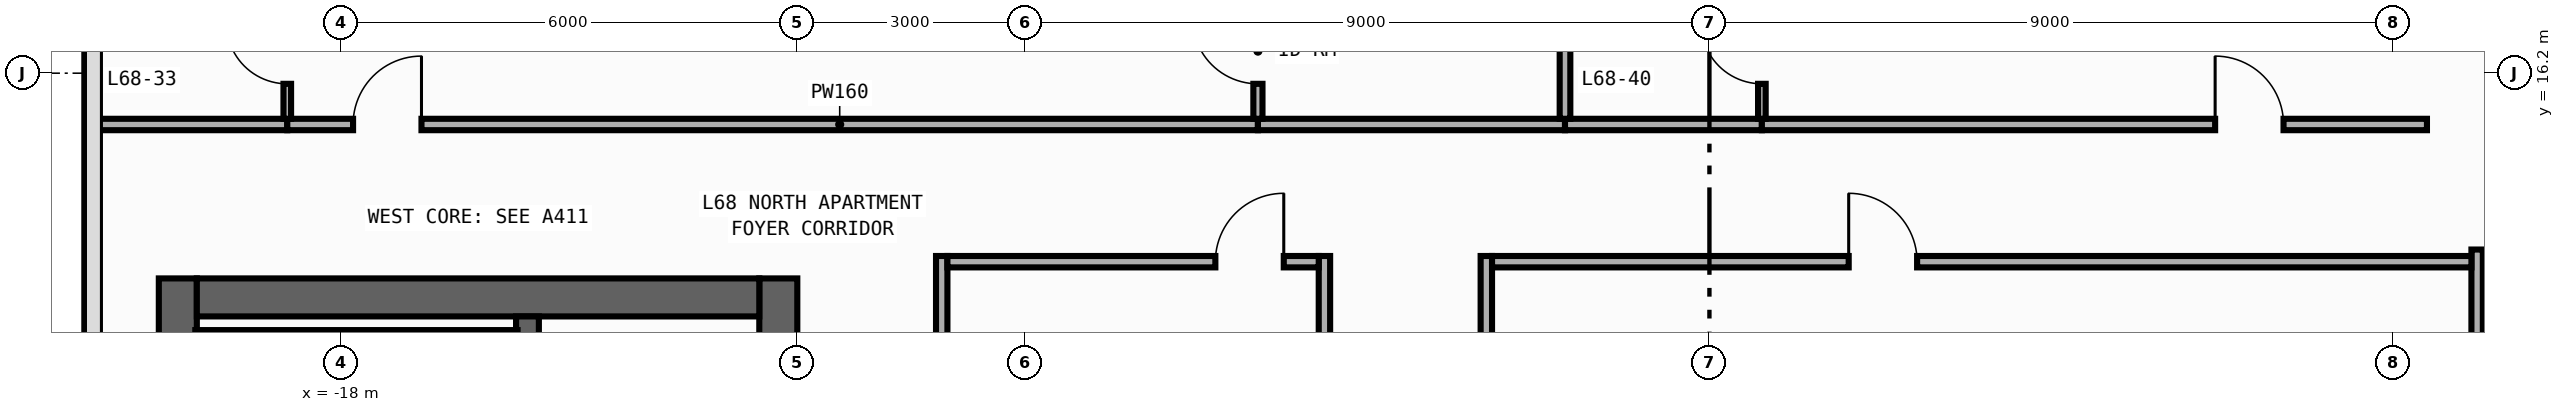
"""IFC4 building model, lengths in metres.
Left out: names, types, materials, properties, quantities, classifications, styles, units other than length and angle.
Written with IfcOpenShell. Run it as: python <this file> out.ifc"""

import sys

from ifc_helpers import new_model, si_unit, direction, frame, frame_2d, origin, place, context, subcontext, project, spatial, rectangle, extrude, element, fill, save


model = new_model("IFC4")
c1 = context("Model", 3, precision=1e-05, world=origin(), true_north=direction((0.0, 1.0)))
c2 = subcontext(c1, "Body", "Model", "MODEL_VIEW")
j1 = project(units=[si_unit("LENGTHUNIT", "METRE"), si_unit("PLANEANGLEUNIT", "RADIAN")], contexts=[c1])
p1 = place(None, origin())
s1 = spatial("IfcSite", under=j1, at=p1, CompositionType="ELEMENT")
p2 = place(p1, origin())
s2 = spatial("IfcBuilding", under=s1, at=p2, CompositionType="ELEMENT")
p3 = place(p2, frame((0.0, 0.0, 285.2)))
s3 = spatial("IfcBuildingStorey", under=s2, at=p3, CompositionType="ELEMENT", Elevation=285.2)
p4 = place(p3, frame((-20.15, -13.5, 0.0), z_axis=(0.0, 0.0, 1.0), x_axis=(0.0, 1.0, 0.0)))
e1 = element("IfcWall", 1, at=p4, inside=s3, PredefinedType="SHEAR", context=c2, shape_type="SweptSolid", body=[
    extrude(rectangle(XDim=27.0, YDim=0.5, at=frame_2d((13.5, 0.0))), origin(), (0.0, 0.0, 1.0), 3.54),
])
p5 = place(p3, frame((-12.25, -13.5, 0.0), z_axis=(0.0, 0.0, 1.0), x_axis=(0.0, 1.0, 0.0)))
e2 = element("IfcWall", 2, at=p5, inside=s3, PredefinedType="SHEAR", context=c2, shape_type="SweptSolid", body=[
    extrude(rectangle(XDim=27.0, YDim=0.5, at=frame_2d((13.5, 0.0))), origin(), (0.0, 0.0, 1.0), 3.54),
])
p6 = place(p5, frame((15.175, 0.0, 0.0)))
e3 = element("IfcOpeningElement", 3, at=p6, cuts=e2, PredefinedType="OPENING", context=c2, shape_type="SweptSolid", body=[
    extrude(rectangle(XDim=0.85, YDim=2.1, at=frame_2d((0.425, 1.05))), frame((0.0, 0.26, 0.0), z_axis=(0.0, -1.0, 0.0), x_axis=(1.0, 0.0, 0.0)), (0.0, 0.0, 1.0), 0.52),
])
p7 = place(p5, frame((21.275, 0.0, 0.0)))
e4 = element("IfcOpeningElement", 4, at=p7, cuts=e2, PredefinedType="OPENING", context=c2, shape_type="SweptSolid", body=[
    extrude(rectangle(XDim=0.85, YDim=2.1, at=frame_2d((0.425, 1.05))), frame((0.0, 0.26, 0.0), z_axis=(0.0, -1.0, 0.0), x_axis=(1.0, 0.0, 0.0)), (0.0, 0.0, 1.0), 0.52),
])
p8 = place(p5, frame((4.275, 0.0, 0.0)))
e5 = element("IfcOpeningElement", 5, at=p8, cuts=e2, PredefinedType="OPENING", context=c2, shape_type="SweptSolid", body=[
    extrude(rectangle(XDim=0.85, YDim=2.1, at=frame_2d((0.425, 1.05))), frame((0.0, 0.26, 0.0), z_axis=(0.0, -1.0, 0.0), x_axis=(1.0, 0.0, 0.0)), (0.0, 0.0, 1.0), 0.52),
])
p9 = place(p5, frame((10.275, 0.0, 0.0)))
e6 = element("IfcOpeningElement", 6, at=p9, cuts=e2, PredefinedType="OPENING", context=c2, shape_type="SweptSolid", body=[
    extrude(rectangle(XDim=0.85, YDim=2.1, at=frame_2d((0.425, 1.05))), frame((0.0, 0.26, 0.0), z_axis=(0.0, -1.0, 0.0), x_axis=(1.0, 0.0, 0.0)), (0.0, 0.0, 1.0), 0.52),
])
p10 = place(p5, frame((12.725, 0.0, 0.0)))
e7 = element("IfcOpeningElement", 7, at=p10, cuts=e2, PredefinedType="OPENING", context=c2, shape_type="SweptSolid", body=[
    extrude(rectangle(XDim=1.15, YDim=2.2, at=frame_2d((0.575, 1.1))), frame((0.0, 0.26, 0.0), z_axis=(0.0, -1.0, 0.0), x_axis=(1.0, 0.0, 0.0)), (0.0, 0.0, 1.0), 0.52),
])
p11 = place(p5, frame((1.625, 0.0, 0.0)))
e8 = element("IfcOpeningElement", 8, at=p11, cuts=e2, PredefinedType="OPENING", context=c2, shape_type="SweptSolid", body=[
    extrude(rectangle(XDim=0.85, YDim=2.1, at=frame_2d((0.425, 1.05))), frame((0.0, 0.26, 0.0), z_axis=(0.0, -1.0, 0.0), x_axis=(1.0, 0.0, 0.0)), (0.0, 0.0, 1.0), 0.52),
])
p12 = place(p3, frame((-19.9, 13.25, 0.0), z_axis=(0.0, 0.0, 1.0), x_axis=(1.0, 0.0, 0.0)))
e9 = element("IfcWall", 9, at=p12, inside=s3, PredefinedType="SHEAR", context=c2, shape_type="SweptSolid", body=[
    extrude(rectangle(XDim=7.4, YDim=0.5, at=frame_2d((3.7, 0.0))), origin(), (0.0, 0.0, 1.0), 3.54),
])
p13 = place(p3, frame((-15.55, -13.0, 0.0), z_axis=(0.0, 0.0, 1.0), x_axis=(0.0, 1.0, 0.0)))
e10 = element("IfcWall", 10, at=p13, inside=s3, PredefinedType="SHEAR", context=c2, shape_type="SweptSolid", body=[
    extrude(rectangle(XDim=26.0, YDim=0.3, at=frame_2d((13.0, 0.0))), origin(), (0.0, 0.0, 1.0), 3.54),
])
p14 = place(p13, frame((12.225, 0.0, 0.0)))
e11 = element("IfcOpeningElement", 11, at=p14, cuts=e10, PredefinedType="OPENING", context=c2, shape_type="SweptSolid", body=[
    extrude(rectangle(XDim=1.15, YDim=2.2, at=frame_2d((0.575, 1.1))), frame((0.0, 0.16, 0.0), z_axis=(0.0, -1.0, 0.0), x_axis=(1.0, 0.0, 0.0)), (0.0, 0.0, 1.0), 0.32),
])
p15 = place(p13, frame((1.125, 0.0, 0.0)))
e12 = element("IfcOpeningElement", 12, at=p15, cuts=e10, PredefinedType="OPENING", context=c2, shape_type="SweptSolid", body=[
    extrude(rectangle(XDim=0.85, YDim=2.1, at=frame_2d((0.425, 1.05))), frame((0.0, 0.16, 0.0), z_axis=(0.0, -1.0, 0.0), x_axis=(1.0, 0.0, 0.0)), (0.0, 0.0, 1.0), 0.32),
])
p16 = place(p3, frame((-19.92, 12.71, 0.0), z_axis=(0.0, 0.0, 1.0), x_axis=(1.0, 0.0, 0.0)))
e13 = element("IfcWall", 13, at=p16, inside=s3, PredefinedType="SHEAR", context=c2, shape_type="SweptSolid", body=[
    extrude(rectangle(XDim=4.24, YDim=0.22, at=frame_2d((2.12, 0.0))), origin(), (0.0, 0.0, 1.0), 3.54),
])
p17 = place(p3, frame((-10.1, -2.81, 0.0), z_axis=(0.0, 0.0, 1.0), x_axis=(0.0, 1.0, 0.0)))
e14 = element("IfcWall", 14, at=p17, inside=s3, PredefinedType="PARTITIONING", context=c2, shape_type="SweptSolid", body=[
    extrude(rectangle(XDim=16.605, YDim=0.15, at=frame_2d((8.302, 0.0))), origin(), (0.0, 0.0, 1.0), 3.54),
])
p18 = place(p17, frame((7.751, 0.0, 0.0)))
e15 = element("IfcOpeningElement", 15, at=p18, cuts=e14, PredefinedType="OPENING", context=c2, shape_type="SweptSolid", body=[
    extrude(rectangle(XDim=0.9, YDim=2.15, at=frame_2d((0.45, 1.075))), frame((0.0, 0.085, 0.0), z_axis=(0.0, -1.0, 0.0), x_axis=(1.0, 0.0, 0.0)), (0.0, 0.0, 1.0), 0.17),
])
p19 = place(p3, frame((10.1, -2.81, 0.0), z_axis=(0.0, 0.0, 1.0), x_axis=(0.0, 1.0, 0.0)))
e16 = element("IfcWall", 16, at=p19, inside=s3, PredefinedType="PARTITIONING", context=c2, shape_type="SweptSolid", body=[
    extrude(rectangle(XDim=16.69, YDim=0.15, at=frame_2d((8.345, 0.0))), origin(), (0.0, 0.0, 1.0), 3.54),
])
p20 = place(p19, frame((7.694, 0.0, 0.0)))
e17 = element("IfcOpeningElement", 17, at=p20, cuts=e16, PredefinedType="OPENING", context=c2, shape_type="SweptSolid", body=[
    extrude(rectangle(XDim=0.9, YDim=2.15, at=frame_2d((0.45, 1.075))), frame((0.0, 0.085, 0.0), z_axis=(0.0, -1.0, 0.0), x_axis=(1.0, 0.0, 0.0)), (0.0, 0.0, 1.0), 0.17),
])
p21 = place(p3, frame((-5.065, -2.66, 0.0), z_axis=(0.0, 0.0, 1.0), x_axis=(0.0, 1.0, 0.0)))
e18 = element("IfcWall", 18, at=p21, inside=s3, PredefinedType="PARTITIONING", context=c2, shape_type="SweptSolid", body=[
    extrude(rectangle(XDim=16.455, YDim=0.15, at=frame_2d((8.228, 0.0))), origin(), (0.0, 0.0, 1.0), 3.19),
])
p22 = place(p21, frame((7.677, 0.0, 0.0)))
e19 = element("IfcOpeningElement", 19, at=p22, cuts=e18, PredefinedType="OPENING", context=c2, shape_type="SweptSolid", body=[
    extrude(rectangle(XDim=0.9, YDim=2.15, at=frame_2d((0.45, 1.075))), frame((0.0, 0.085, 0.0), z_axis=(0.0, -1.0, 0.0), x_axis=(1.0, 0.0, 0.0)), (0.0, 0.0, 1.0), 0.17),
])
p23 = place(p3, frame((-2.935, -2.66, 0.0), z_axis=(0.0, 0.0, 1.0), x_axis=(0.0, 1.0, 0.0)))
e20 = element("IfcWall", 20, at=p23, inside=s3, PredefinedType="PARTITIONING", context=c2, shape_type="SweptSolid", body=[
    extrude(rectangle(XDim=16.455, YDim=0.15, at=frame_2d((8.228, 0.0))), origin(), (0.0, 0.0, 1.0), 3.54),
])
p24 = place(p23, frame((7.677, 0.0, 0.0)))
e21 = element("IfcOpeningElement", 21, at=p24, cuts=e20, PredefinedType="OPENING", context=c2, shape_type="SweptSolid", body=[
    extrude(rectangle(XDim=0.9, YDim=2.15, at=frame_2d((0.45, 1.075))), frame((0.0, 0.085, 0.0), z_axis=(0.0, -1.0, 0.0), x_axis=(1.0, 0.0, 0.0)), (0.0, 0.0, 1.0), 0.17),
])
p25 = place(p3, frame((-21.255, 15.525, 0.0), z_axis=(0.0, 0.0, 1.0), x_axis=(1.0, 0.0, 0.0)))
e22 = element("IfcWall", 22, at=p25, inside=s3, PredefinedType="PARTITIONING", context=c2, shape_type="SweptSolid", body=[
    extrude(rectangle(XDim=2.545, YDim=0.15, at=frame_2d((1.272, 0.0))), origin(), (0.0, 0.0, 1.0), 3.54),
])
p26 = place(p3, frame((-18.71, 15.525, 0.0), z_axis=(0.0, 0.0, 1.0), x_axis=(1.0, 0.0, 0.0)))
e23 = element("IfcWall", 23, at=p26, inside=s3, PredefinedType="PARTITIONING", context=c2, shape_type="SweptSolid", body=[
    extrude(rectangle(XDim=12.77, YDim=0.15, at=frame_2d((6.385, 0.0))), origin(), (0.0, 0.0, 1.0), 3.54),
])
p27 = place(p26, frame((0.865, 0.0, 0.0)))
e24 = element("IfcOpeningElement", 24, at=p27, cuts=e23, PredefinedType="OPENING", context=c2, shape_type="SweptSolid", body=[
    extrude(rectangle(XDim=0.9, YDim=2.15, at=frame_2d((0.45, 1.075))), frame((0.0, 0.085, 0.0), z_axis=(0.0, -1.0, 0.0), x_axis=(1.0, 0.0, 0.0)), (0.0, 0.0, 1.0), 0.17),
])
p28 = place(p3, frame((-5.94, 15.525, 0.0), z_axis=(0.0, 0.0, 1.0), x_axis=(1.0, 0.0, 0.0)))
e25 = element("IfcWall", 25, at=p28, inside=s3, PredefinedType="PARTITIONING", context=c2, shape_type="SweptSolid", body=[
    extrude(rectangle(XDim=4.04, YDim=0.15, at=frame_2d((2.02, 0.0))), origin(), (0.0, 0.0, 1.0), 3.54),
])
p29 = place(p3, frame((-1.9, 15.525, 0.0), z_axis=(0.0, 0.0, 1.0), x_axis=(1.0, 0.0, 0.0)))
e26 = element("IfcWall", 26, at=p29, inside=s3, PredefinedType="PARTITIONING", context=c2, shape_type="SweptSolid", body=[
    extrude(rectangle(XDim=2.59, YDim=0.15, at=frame_2d((1.295, 0.0))), origin(), (0.0, 0.0, 1.0), 3.54),
])
p30 = place(p3, frame((0.69, 15.525, 0.0), z_axis=(0.0, 0.0, 1.0), x_axis=(1.0, 0.0, 0.0)))
e27 = element("IfcWall", 27, at=p30, inside=s3, PredefinedType="PARTITIONING", context=c2, shape_type="SweptSolid", body=[
    extrude(rectangle(XDim=8.75, YDim=0.15, at=frame_2d((4.375, 0.0))), origin(), (0.0, 0.0, 1.0), 3.54),
])
p31 = place(p30, frame((5.963, 0.0, 0.0)))
e28 = element("IfcOpeningElement", 28, at=p31, cuts=e27, PredefinedType="OPENING", context=c2, shape_type="SweptSolid", body=[
    extrude(rectangle(XDim=0.9, YDim=2.15, at=frame_2d((0.45, 1.075))), frame((0.0, 0.085, 0.0), z_axis=(0.0, -1.0, 0.0), x_axis=(1.0, 0.0, 0.0)), (0.0, 0.0, 1.0), 0.17),
])
p32 = place(p3, frame((-10.025, 13.72, 0.0), z_axis=(0.0, 0.0, 1.0), x_axis=(1.0, 0.0, 0.0)))
e29 = element("IfcWall", 29, at=p32, inside=s3, PredefinedType="PARTITIONING", context=c2, shape_type="SweptSolid", body=[
    extrude(rectangle(XDim=4.885, YDim=0.15, at=frame_2d((2.442, 0.0))), origin(), (0.0, 0.0, 1.0), 3.54),
])
p33 = place(p32, frame((3.525, 0.0, 0.0)))
e30 = element("IfcOpeningElement", 30, at=p33, cuts=e29, PredefinedType="OPENING", context=c2, shape_type="SweptSolid", body=[
    extrude(rectangle(XDim=0.9, YDim=2.15, at=frame_2d((0.45, 1.075))), frame((0.0, 0.085, 0.0), z_axis=(0.0, -1.0, 0.0), x_axis=(1.0, 0.0, 0.0)), (0.0, 0.0, 1.0), 0.17),
])
p34 = place(p3, frame((-2.86, 13.72, 0.0), z_axis=(0.0, 0.0, 1.0), x_axis=(1.0, 0.0, 0.0)))
e31 = element("IfcWall", 31, at=p34, inside=s3, PredefinedType="PARTITIONING", context=c2, shape_type="SweptSolid", body=[
    extrude(rectangle(XDim=12.885, YDim=0.15, at=frame_2d((6.442, 0.0))), origin(), (0.0, 0.0, 1.0), 3.54),
])
p35 = place(p34, frame((4.692, 0.0, 0.0)))
e32 = element("IfcOpeningElement", 32, at=p35, cuts=e31, PredefinedType="OPENING", context=c2, shape_type="SweptSolid", body=[
    extrude(rectangle(XDim=0.9, YDim=2.15, at=frame_2d((0.45, 1.075))), frame((0.0, 0.085, 0.0), z_axis=(0.0, -1.0, 0.0), x_axis=(1.0, 0.0, 0.0)), (0.0, 0.0, 1.0), 0.17),
])
p36 = place(p3, frame((-18.71, 15.6, 0.0), z_axis=(0.0, 0.0, 1.0), x_axis=(0.0, 1.0, 0.0)))
e33 = element("IfcWall", 33, at=p36, inside=s3, PredefinedType="PARTITIONING", context=c2, shape_type="SweptSolid", body=[
    extrude(rectangle(XDim=2.5, YDim=0.1, at=frame_2d((1.25, 0.0))), origin(), (0.0, 0.0, 1.0), 3.54),
])
p37 = place(p36, frame((0.46, 0.0, 0.0)))
e34 = element("IfcOpeningElement", 34, at=p37, cuts=e33, PredefinedType="OPENING", context=c2, shape_type="SweptSolid", body=[
    extrude(rectangle(XDim=0.8, YDim=2.1, at=frame_2d((0.4, 1.05))), frame((0.0, 0.06, 0.0), z_axis=(0.0, -1.0, 0.0), x_axis=(1.0, 0.0, 0.0)), (0.0, 0.0, 1.0), 0.12),
])
p38 = place(p3, frame((-5.94, 15.6, 0.0), z_axis=(0.0, 0.0, 1.0), x_axis=(0.0, 1.0, 0.0)))
e35 = element("IfcWall", 35, at=p38, inside=s3, PredefinedType="PARTITIONING", context=c2, shape_type="SweptSolid", body=[
    extrude(rectangle(XDim=4.5, YDim=0.12, at=frame_2d((2.25, 0.0))), origin(), (0.0, 0.0, 1.0), 3.54),
])
p39 = place(p38, frame((0.46, 0.0, 0.0)))
e36 = element("IfcOpeningElement", 36, at=p39, cuts=e35, PredefinedType="OPENING", context=c2, shape_type="SweptSolid", body=[
    extrude(rectangle(XDim=0.86, YDim=2.15, at=frame_2d((0.43, 1.075))), frame((0.0, 0.07, 0.0), z_axis=(0.0, -1.0, 0.0), x_axis=(1.0, 0.0, 0.0)), (0.0, 0.0, 1.0), 0.14),
])
p40 = place(p3, frame((-1.9, 15.6, 0.0), z_axis=(0.0, 0.0, 1.0), x_axis=(0.0, 1.0, 0.0)))
e37 = element("IfcWall", 37, at=p40, inside=s3, PredefinedType="PARTITIONING", context=c2, shape_type="SweptSolid", body=[
    extrude(rectangle(XDim=2.5, YDim=0.14, at=frame_2d((1.25, 0.0))), origin(), (0.0, 0.0, 1.0), 3.54),
])
p41 = place(p3, frame((0.69, 15.6, 0.0), z_axis=(0.0, 0.0, 1.0), x_axis=(0.0, 1.0, 0.0)))
e38 = element("IfcWall", 38, at=p41, inside=s3, PredefinedType="PARTITIONING", context=c2, shape_type="SweptSolid", body=[
    extrude(rectangle(XDim=2.5, YDim=0.1, at=frame_2d((1.25, 0.0))), origin(), (0.0, 0.0, 1.0), 3.54),
])
p42 = place(p41, frame((0.46, 0.0, 0.0)))
e39 = element("IfcOpeningElement", 39, at=p42, cuts=e38, PredefinedType="OPENING", context=c2, shape_type="SweptSolid", body=[
    extrude(rectangle(XDim=0.8, YDim=2.1, at=frame_2d((0.4, 1.05))), frame((0.0, 0.06, 0.0), z_axis=(0.0, -1.0, 0.0), x_axis=(1.0, 0.0, 0.0)), (0.0, 0.0, 1.0), 0.12),
])
p43 = place(p27, origin())
e40 = element("IfcDoor", 40, at=p43, inside=s3, OperationType="SINGLE_SWING_RIGHT", PredefinedType="DOOR", context=c2, shape_type="SweptSolid", body=[
    extrude(rectangle(XDim=0.9, YDim=2.15, at=frame_2d((0.45, 1.075))), frame((0.0, 0.025, 0.0), z_axis=(0.0, -1.0, 0.0), x_axis=(1.0, 0.0, 0.0)), (0.0, 0.0, 1.0), 0.05),
])
fill(e24, e40)
p44 = place(p31, origin())
e41 = element("IfcDoor", 41, at=p44, inside=s3, OperationType="SINGLE_SWING_LEFT", PredefinedType="DOOR", context=c2, shape_type="SweptSolid", body=[
    extrude(rectangle(XDim=0.9, YDim=2.15, at=frame_2d((0.45, 1.075))), frame((0.0, 0.025, 0.0), z_axis=(0.0, -1.0, 0.0), x_axis=(1.0, 0.0, 0.0)), (0.0, 0.0, 1.0), 0.05),
])
fill(e28, e41)
p45 = place(p33, origin())
e42 = element("IfcDoor", 42, at=p45, inside=s3, OperationType="SINGLE_SWING_RIGHT", PredefinedType="DOOR", context=c2, shape_type="SweptSolid", body=[
    extrude(rectangle(XDim=0.9, YDim=2.15, at=frame_2d((0.45, 1.075))), frame((0.0, 0.025, 0.0), z_axis=(0.0, -1.0, 0.0), x_axis=(1.0, 0.0, 0.0)), (0.0, 0.0, 1.0), 0.05),
])
fill(e30, e42)
p46 = place(p35, origin())
e43 = element("IfcDoor", 43, at=p46, inside=s3, OperationType="SINGLE_SWING_LEFT", PredefinedType="DOOR", context=c2, shape_type="SweptSolid", body=[
    extrude(rectangle(XDim=0.9, YDim=2.15, at=frame_2d((0.45, 1.075))), frame((0.0, 0.025, 0.0), z_axis=(0.0, -1.0, 0.0), x_axis=(1.0, 0.0, 0.0)), (0.0, 0.0, 1.0), 0.05),
])
fill(e32, e43)
p47 = place(p37, origin())
e44 = element("IfcDoor", 44, at=p47, inside=s3, OperationType="SINGLE_SWING_RIGHT", PredefinedType="DOOR", context=c2, shape_type="SweptSolid", body=[
    extrude(rectangle(XDim=0.8, YDim=2.1, at=frame_2d((0.4, 1.05))), frame((0.0, 0.025, 0.0), z_axis=(0.0, -1.0, 0.0), x_axis=(1.0, 0.0, 0.0)), (0.0, 0.0, 1.0), 0.05),
])
fill(e34, e44)
p48 = place(p39, origin())
e45 = element("IfcDoor", 45, at=p48, inside=s3, OperationType="SINGLE_SWING_RIGHT", PredefinedType="DOOR", context=c2, shape_type="SweptSolid", body=[
    extrude(rectangle(XDim=0.86, YDim=2.15, at=frame_2d((0.43, 1.075))), frame((0.0, 0.025, 0.0), z_axis=(0.0, -1.0, 0.0), x_axis=(1.0, 0.0, 0.0)), (0.0, 0.0, 1.0), 0.05),
])
fill(e36, e45)
p49 = place(p42, origin())
e46 = element("IfcDoor", 46, at=p49, inside=s3, OperationType="SINGLE_SWING_RIGHT", PredefinedType="DOOR", context=c2, shape_type="SweptSolid", body=[
    extrude(rectangle(XDim=0.8, YDim=2.1, at=frame_2d((0.4, 1.05))), frame((0.0, 0.025, 0.0), z_axis=(0.0, -1.0, 0.0), x_axis=(1.0, 0.0, 0.0)), (0.0, 0.0, 1.0), 0.05),
])
fill(e39, e46)
save(model, sys.argv[1])
